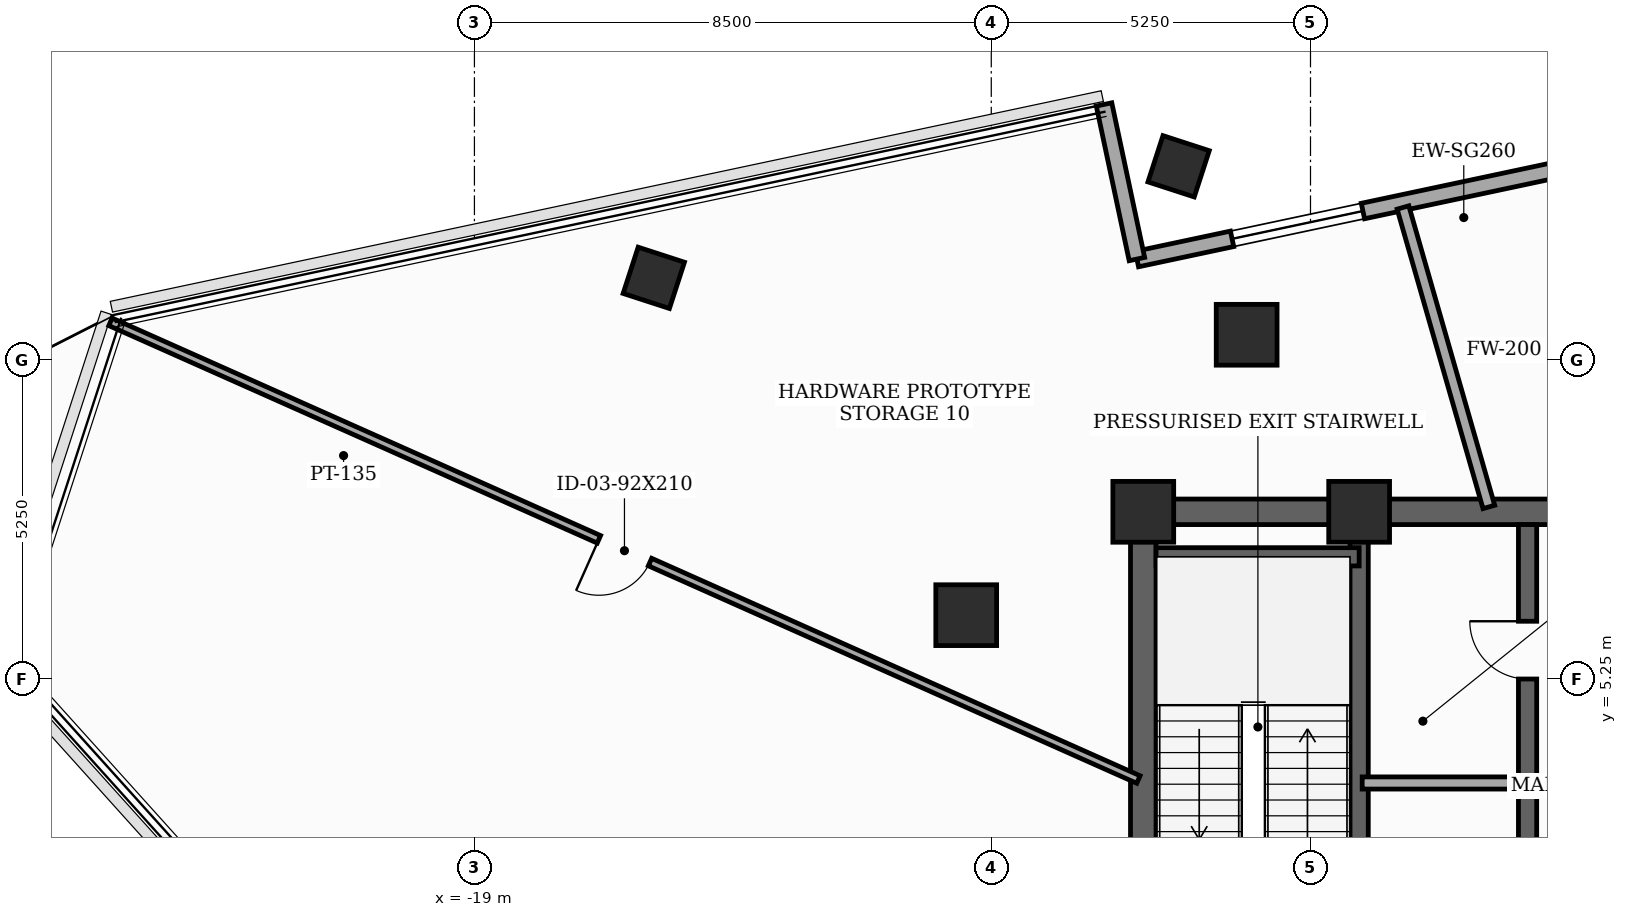
"""IFC4 building model, lengths in metres.
Left out: names, types, materials, properties, quantities, classifications, styles, units other than length and angle.
Written with IfcOpenShell. Run it as: python <this file> out.ifc"""

import sys

from ifc_helpers import new_model, si_unit, direction, frame, frame_2d, origin, origin_2d, place, context, subcontext, project, spatial, rectangle, extrude, element, fill, save


model = new_model("IFC4")
c1 = context("Model", 3, precision=1e-05, world=origin(), true_north=direction((0.0, 1.0)))
c2 = subcontext(c1, "Body", "Model", "MODEL_VIEW")
j1 = project(units=[si_unit("LENGTHUNIT", "METRE"), si_unit("PLANEANGLEUNIT", "RADIAN")], contexts=[c1])
p1 = place(None, origin())
s1 = spatial("IfcSite", under=j1, at=p1, CompositionType="ELEMENT")
p2 = place(p1, origin())
s2 = spatial("IfcBuilding", under=s1, at=p2, CompositionType="ELEMENT")
p3 = place(p2, frame((0.0, 0.0, 294.3)))
s3 = spatial("IfcBuildingStorey", under=s2, at=p3, CompositionType="ELEMENT", Elevation=294.3)
for number, where, z_axis, x_axis in (
    (1, (-4.45, 8.0, 0.0), (0.0, 0.0, 1.0), (1.0, 0.0, 0.0)),
    (2, (-8.0, 8.0, 0.0), (0.0, 0.0, 1.0), (1.0, 0.0, 0.0)),
    (3, (-6.3, 10.912, 0.0), (0.0, 0.0, 1.0), (1.0, 0.0, 0.0)),
    (4, (-10.912, 6.3, 0.0), (0.0, 0.0, 1.0), (1.0, 0.0, 0.0)),
):
    element("IfcColumn", number, at=place(p3, frame(where, z_axis=z_axis, x_axis=x_axis)), inside=s3, PredefinedType="COLUMN", context=c2, shape_type="SweptSolid", body=[
        extrude(rectangle(XDim=1.0, YDim=1.0, at=origin_2d()), origin(), (0.0, 0.0, 1.0), 3.7),
    ])
for number, where, z_axis, x_axis in (
    (5, (-7.419, 13.683, 0.0), (0.0, 0.0, 1.0), (0.309, 0.951, 0.0)),
    (6, (-16.05, 11.848, 0.0), (0.0, 0.0, 1.0), (0.309, 0.951, 0.0)),
):
    element("IfcColumn", number, at=place(p3, frame(where, z_axis=z_axis, x_axis=x_axis)), inside=s3, PredefinedType="COLUMN", context=c2, shape_type="SweptSolid", body=[
        extrude(rectangle(XDim=0.8, YDim=0.8, at=origin_2d()), origin(), (0.0, 0.0, 1.0), 3.7),
    ])
p4 = place(p3, frame((2.459, 14.402, 0.0), z_axis=(0.0, 0.0, 1.0), x_axis=(-0.978149082982, -0.207904717268, 0.0)))
e7 = element("IfcWall", 7, at=p4, inside=s3, PredefinedType="SOLIDWALL", context=c2, shape_type="SweptSolid", body=[
    extrude(rectangle(XDim=10.8, YDim=0.26, at=frame_2d((5.4, 0.0))), origin(), (0.0, 0.0, 1.0), 3.5),
])
p5 = place(p4, frame((1.6, 0.0, 0.85)))
e8 = element("IfcOpeningElement", 8, at=p5, cuts=e7, PredefinedType="OPENING", context=c2, shape_type="SweptSolid", body=[
    extrude(rectangle(XDim=2.2, YDim=1.25, at=frame_2d((1.1, 0.625))), frame((0.0, 0.14, 0.0), z_axis=(0.0, -1.0, 0.0), x_axis=(1.0, 0.0, 0.0)), (0.0, 0.0, 1.0), 0.28),
])
p6 = place(p4, frame((7.0, 0.0, 0.85)))
e9 = element("IfcOpeningElement", 9, at=p6, cuts=e7, PredefinedType="OPENING", context=c2, shape_type="SweptSolid", body=[
    extrude(rectangle(XDim=2.2, YDim=1.25, at=frame_2d((1.1, 0.625))), frame((0.0, 0.14, 0.0), z_axis=(0.0, -1.0, 0.0), x_axis=(1.0, 0.0, 0.0)), (0.0, 0.0, 1.0), 0.28),
])
p7 = place(p3, frame((-8.105, 12.157, 0.0), z_axis=(0.0, 0.0, 1.0), x_axis=(-0.207893569688, 0.978151452323, 0.0)))
e10 = element("IfcWall", 10, at=p7, inside=s3, PredefinedType="SOLIDWALL", context=c2, shape_type="SweptSolid", body=[
    extrude(rectangle(XDim=2.6, YDim=0.26, at=frame_2d((1.3, 0.0))), origin(), (0.0, 0.0, 1.0), 3.5),
])
p8 = place(p3, frame((-8.0, -8.0, 0.0), z_axis=(0.0, 0.0, 1.0), x_axis=(0.0, 1.0, 0.0)))
e11 = element("IfcWall", 11, at=p8, inside=s3, PredefinedType="SHEAR", context=c2, shape_type="SweptSolid", body=[
    extrude(rectangle(XDim=16.0, YDim=0.42, at=frame_2d((8.0, 0.0))), origin(), (0.0, 0.0, 1.0), 3.5),
])
p9 = place(p8, frame((0.681, 0.0, 0.0)))
e12 = element("IfcOpeningElement", 12, at=p9, cuts=e11, PredefinedType="OPENING", context=c2, shape_type="SweptSolid", body=[
    extrude(rectangle(XDim=0.85, YDim=2.02, at=frame_2d((0.425, 1.01))), frame((0.0, 0.22, 0.0), z_axis=(0.0, -1.0, 0.0), x_axis=(1.0, 0.0, 0.0)), (0.0, 0.0, 1.0), 0.44),
])
p10 = place(p8, frame((5.35, 0.0, 0.0)))
e13 = element("IfcOpeningElement", 13, at=p10, cuts=e11, PredefinedType="OPENING", context=c2, shape_type="SweptSolid", body=[
    extrude(rectangle(XDim=1.05, YDim=2.15, at=frame_2d((0.525, 1.075))), frame((0.0, 0.22, 0.0), z_axis=(0.0, -1.0, 0.0), x_axis=(1.0, 0.0, 0.0)), (0.0, 0.0, 1.0), 0.44),
])
p11 = place(p3, frame((-8.0, 8.0, 0.0), z_axis=(0.0, 0.0, 1.0), x_axis=(1.0, 0.0, 0.0)))
e14 = element("IfcWall", 14, at=p11, inside=s3, PredefinedType="SHEAR", context=c2, shape_type="SweptSolid", body=[
    extrude(rectangle(XDim=16.0, YDim=0.42, at=frame_2d((8.0, 0.0))), origin(), (0.0, 0.0, 1.0), 3.5),
])
p12 = place(p11, frame((7.1, 0.0, 0.0)))
e15 = element("IfcOpeningElement", 15, at=p12, cuts=e14, PredefinedType="OPENING", context=c2, shape_type="SweptSolid", body=[
    extrude(rectangle(XDim=1.8, YDim=2.15, at=frame_2d((0.9, 1.075))), frame((0.0, 0.22, 0.0), z_axis=(0.0, -1.0, 0.0), x_axis=(1.0, 0.0, 0.0)), (0.0, 0.0, 1.0), 0.44),
])
p13 = place(p3, frame((-4.45, -7.79, 0.0), z_axis=(0.0, 0.0, 1.0), x_axis=(0.0, 1.0, 0.0)))
e16 = element("IfcWall", 16, at=p13, inside=s3, PredefinedType="SHEAR", context=c2, shape_type="SweptSolid", body=[
    extrude(rectangle(XDim=15.58, YDim=0.3, at=frame_2d((7.79, 0.0))), origin(), (0.0, 0.0, 1.0), 3.5),
])
p14 = place(p3, frame((-7.79, 7.26, 0.0), z_axis=(0.0, 0.0, 1.0), x_axis=(1.0, 0.0, 0.0)))
e17 = element("IfcWall", 17, at=p14, inside=s3, PredefinedType="SHEAR", context=c2, shape_type="SweptSolid", body=[
    extrude(rectangle(XDim=3.34, YDim=0.3, at=frame_2d((1.67, 0.0))), origin(), (0.0, 0.0, 1.0), 3.5),
])
p15 = place(p3, frame((-1.68, -4.85, 0.0), z_axis=(0.0, 0.0, 1.0), x_axis=(0.0, 1.0, 0.0)))
e18 = element("IfcWall", 18, at=p15, inside=s3, PredefinedType="SHEAR", context=c2, shape_type="SweptSolid", body=[
    extrude(rectangle(XDim=12.64, YDim=0.3, at=frame_2d((6.32, 0.0))), origin(), (0.0, 0.0, 1.0), 3.5),
])
p16 = place(p15, frame((1.65, 0.0, 0.0)))
e19 = element("IfcOpeningElement", 19, at=p16, cuts=e18, PredefinedType="OPENING", context=c2, shape_type="SweptSolid", body=[
    extrude(rectangle(XDim=0.95, YDim=2.1, at=frame_2d((0.475, 1.05))), frame((0.0, 0.16, 0.0), z_axis=(0.0, -1.0, 0.0), x_axis=(1.0, 0.0, 0.0)), (0.0, 0.0, 1.0), 0.32),
])
p17 = place(p15, frame((5.9, 0.0, 0.0)))
e20 = element("IfcOpeningElement", 20, at=p17, cuts=e18, PredefinedType="OPENING", context=c2, shape_type="SweptSolid", body=[
    extrude(rectangle(XDim=0.95, YDim=2.1, at=frame_2d((0.475, 1.05))), frame((0.0, 0.16, 0.0), z_axis=(0.0, -1.0, 0.0), x_axis=(1.0, 0.0, 0.0)), (0.0, 0.0, 1.0), 0.32),
])
p18 = place(p15, frame((10.1, 0.0, 0.0)))
e21 = element("IfcOpeningElement", 21, at=p18, cuts=e18, PredefinedType="OPENING", context=c2, shape_type="SweptSolid", body=[
    extrude(rectangle(XDim=0.95, YDim=2.1, at=frame_2d((0.475, 1.05))), frame((0.0, 0.16, 0.0), z_axis=(0.0, -1.0, 0.0), x_axis=(1.0, 0.0, 0.0)), (0.0, 0.0, 1.0), 0.32),
])
p19 = place(p3, frame((-4.4, 3.54, 0.0), z_axis=(0.0, 0.0, 1.0), x_axis=(1.0, 0.0, 0.0)))
e22 = element("IfcWall", 22, at=p19, inside=s3, PredefinedType="SOLIDWALL", context=c2, shape_type="SweptSolid", body=[
    extrude(rectangle(XDim=2.68, YDim=0.2, at=frame_2d((1.34, 0.0))), origin(), (0.0, 0.0, 1.0), 3.5),
])
p20 = place(p3, frame((-8.08, 3.597, 0.0), z_axis=(0.0, 0.0, 1.0), x_axis=(-0.913542590258, 0.406743083266, 0.0)))
e23 = element("IfcWall", 23, at=p20, inside=s3, PredefinedType="PARTITIONING", context=c2, shape_type="SweptSolid", body=[
    extrude(rectangle(XDim=18.505, YDim=0.135, at=frame_2d((9.252, 0.0))), origin(), (0.0, 0.0, 1.0), 2.885),
])
p21 = place(p20, frame((8.792, 0.0, 0.0)))
e24 = element("IfcOpeningElement", 24, at=p21, cuts=e23, PredefinedType="OPENING", context=c2, shape_type="SweptSolid", body=[
    extrude(rectangle(XDim=0.92, YDim=2.1, at=frame_2d((0.46, 1.05))), frame((0.0, 0.077, 0.0), z_axis=(0.0, -1.0, 0.0), x_axis=(1.0, 0.0, 0.0)), (0.0, 0.0, 1.0), 0.155),
])
p22 = place(p3, frame((-3.729, 13.005, 0.0), z_axis=(0.0, 0.0, 1.0), x_axis=(0.275658725111, -0.961255568135, 0.0)))
e25 = element("IfcWall", 25, at=p22, inside=s3, PredefinedType="SOLIDWALL", context=c2, shape_type="SweptSolid", body=[
    extrude(rectangle(XDim=5.124, YDim=0.2, at=frame_2d((2.562, 0.0))), origin(), (0.0, 0.0, 1.0), 2.885),
])
p23 = place(p6, origin())
e26 = element("IfcWindow", 26, at=p23, inside=s3, PartitioningType="SINGLE_PANEL", PredefinedType="WINDOW", context=c2, shape_type="SweptSolid", body=[
    extrude(rectangle(XDim=2.2, YDim=1.25, at=frame_2d((1.1, 0.625))), frame((0.0, 0.03, 0.0), z_axis=(0.0, -1.0, 0.0), x_axis=(1.0, 0.0, 0.0)), (0.0, 0.0, 1.0), 0.06),
])
fill(e9, e26)
p24 = place(p18, origin())
e27 = element("IfcDoor", 27, at=p24, inside=s3, OperationType="SINGLE_SWING_RIGHT", PredefinedType="DOOR", context=c2, shape_type="SweptSolid", body=[
    extrude(rectangle(XDim=0.95, YDim=2.1, at=frame_2d((0.475, 1.05))), frame((0.0, 0.025, 0.0), z_axis=(0.0, -1.0, 0.0), x_axis=(1.0, 0.0, 0.0)), (0.0, 0.0, 1.0), 0.05),
])
fill(e21, e27)
p25 = place(p21, origin())
e28 = element("IfcDoor", 28, at=p25, inside=s3, OperationType="SINGLE_SWING_RIGHT", PredefinedType="DOOR", context=c2, shape_type="SweptSolid", body=[
    extrude(rectangle(XDim=0.92, YDim=2.1, at=frame_2d((0.46, 1.05))), frame((0.0, 0.025, 0.0), z_axis=(0.0, -1.0, 0.0), x_axis=(1.0, 0.0, 0.0)), (0.0, 0.0, 1.0), 0.05),
])
fill(e24, e28)
save(model, sys.argv[1])
